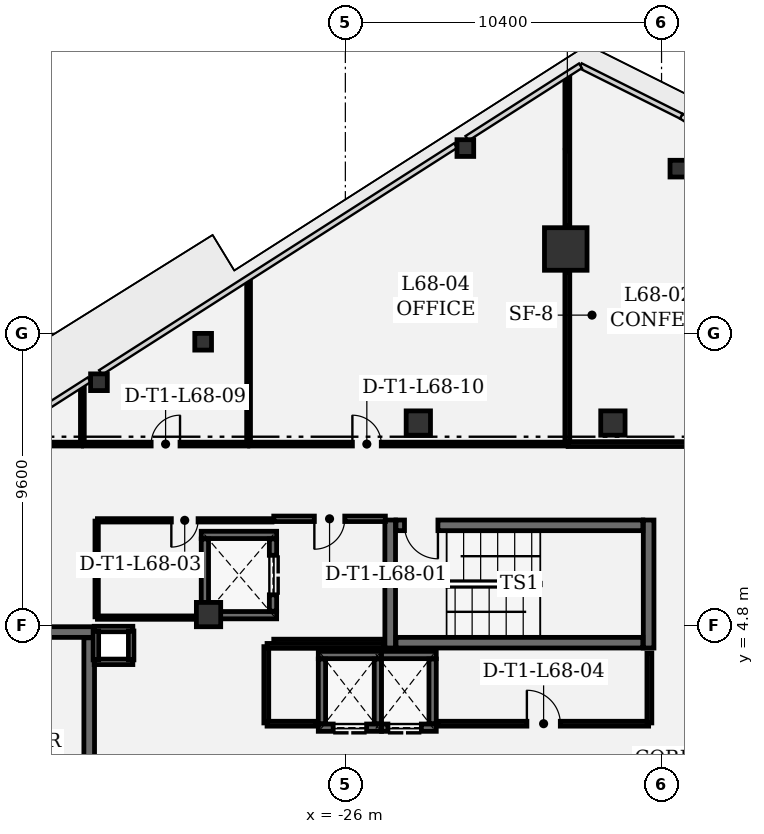
"""IFC4 building model, lengths in metres.
Left out: names, types, materials, properties, quantities, classifications, styles, units other than length and angle.
Written with IfcOpenShell. Run it as: python <this file> out.ifc"""

import sys

from ifc_helpers import new_model, si_unit, direction, frame, frame_2d, origin, origin_2d, place, context, subcontext, project, spatial, rectangle, extrude, element, fill, save


model = new_model("IFC4")
c1 = context("Model", 3, precision=1e-05, world=origin(), true_north=direction((0.0, 1.0)))
c2 = subcontext(c1, "Body", "Model", "MODEL_VIEW")
j1 = project(units=[si_unit("LENGTHUNIT", "METRE"), si_unit("PLANEANGLEUNIT", "RADIAN")], contexts=[c1])
p1 = place(None, origin())
s1 = spatial("IfcSite", under=j1, at=p1, CompositionType="ELEMENT")
p2 = place(p1, origin())
s2 = spatial("IfcBuilding", under=s1, at=p2, CompositionType="ELEMENT")
p3 = place(p2, frame((0.0, 0.0, 293.4)))
s3 = spatial("IfcBuildingStorey", under=s2, at=p3, CompositionType="ELEMENT", Elevation=293.4)
p4 = place(p3, frame((-18.75, 17.176, 0.0), z_axis=(0.0, 0.0, 1.0), x_axis=(1.0, 0.0, 0.0)))
e1 = element("IfcColumn", 1, at=p4, inside=s3, PredefinedType="COLUMN", context=c2, shape_type="SweptSolid", body=[
    extrude(rectangle(XDim=1.4, YDim=1.4, at=origin_2d()), origin(), (0.0, 0.0, 1.0), 4.2),
])
for number, where, z_axis, x_axis in (
    (2, (-23.6, 11.45, 0.0), (0.0, 0.0, 1.0), (1.0, 0.0, 0.0)),
    (3, (-17.2, 11.45, 0.0), (0.0, 0.0, 1.0), (1.0, 0.0, 0.0)),
    (4, (-30.5, 5.15, 0.0), (0.0, 0.0, 1.0), (1.0, 0.0, 0.0)),
):
    element("IfcColumn", number, at=place(p3, frame(where, z_axis=z_axis, x_axis=x_axis)), inside=s3, PredefinedType="COLUMN", context=c2, shape_type="SweptSolid", body=[
        extrude(rectangle(XDim=0.8, YDim=0.8, at=origin_2d()), origin(), (0.0, 0.0, 1.0), 4.2),
    ])
for number, where, z_axis, x_axis in (
    (5, (-34.104, 12.792, 0.0), (0.0, 0.0, 1.0), (1.0, 0.0, 0.0)),
    (6, (-22.053, 20.495, 0.0), (0.0, 0.0, 1.0), (1.0, 0.0, 0.0)),
    (7, (-30.677, 14.124, 0.0), (0.0, 0.0, 1.0), (1.0, 0.0, 0.0)),
    (8, (-15.046, 19.818, 0.0), (0.0, 0.0, 1.0), (1.0, 0.0, 0.0)),
):
    element("IfcColumn", number, at=place(p3, frame(where, z_axis=z_axis, x_axis=x_axis)), inside=s3, PredefinedType="COLUMN", context=c2, shape_type="SweptSolid", body=[
        extrude(rectangle(XDim=0.55, YDim=0.55, at=origin_2d()), origin(), (0.0, 0.0, 1.0), 4.2),
    ])
for number, where, z_axis, x_axis in (
    (9, (-24.525, 8.26, 0.0), (0.0, 0.0, 1.0), (0.0, -1.0, 0.0)),
    (10, (-16.025, 4.05, 0.0), (0.0, 0.0, 1.0), (0.0, 1.0, 0.0)),
):
    element("IfcWall", number, at=place(p3, frame(where, z_axis=z_axis, x_axis=x_axis)), inside=s3, PredefinedType="SHEAR", context=c2, shape_type="SweptSolid", body=[
        extrude(rectangle(XDim=4.21, YDim=0.35, at=frame_2d((2.105, 0.0))), origin(), (0.0, 0.0, 1.0), 3.91),
    ])
p5 = place(p3, frame((-24.335, 4.225, 0.0), z_axis=(0.0, 0.0, 1.0), x_axis=(1.0, 0.0, 0.0)))
e11 = element("IfcWall", 11, at=p5, inside=s3, PredefinedType="SHEAR", context=c2, shape_type="SweptSolid", body=[
    extrude(rectangle(XDim=8.12, YDim=0.35, at=frame_2d((4.06, 0.0))), origin(), (0.0, 0.0, 1.0), 3.91),
])
p6 = place(p3, frame((-16.215, 8.085, 0.0), z_axis=(0.0, 0.0, 1.0), x_axis=(-1.0, 0.0, 0.0)))
e12 = element("IfcWall", 12, at=p6, inside=s3, PredefinedType="SHEAR", context=c2, shape_type="SweptSolid", body=[
    extrude(rectangle(XDim=8.12, YDim=0.35, at=frame_2d((4.06, 0.0))), origin(), (0.0, 0.0, 1.0), 3.91),
])
p7 = place(p6, frame((6.74, 0.0, 0.0)))
e13 = element("IfcOpeningElement", 13, at=p7, cuts=e12, PredefinedType="OPENING", context=c2, shape_type="SweptSolid", body=[
    extrude(rectangle(XDim=1.1, YDim=2.2, at=frame_2d((0.55, 1.1))), frame((0.0, 0.185, 0.0), z_axis=(0.0, -1.0, 0.0), x_axis=(1.0, 0.0, 0.0)), (0.0, 0.0, 1.0), 0.37),
])
p8 = place(p3, frame((-34.25, 4.575, 0.0), z_axis=(0.0, 0.0, 1.0), x_axis=(-1.0, 0.0, 0.0)))
e14 = element("IfcWall", 14, at=p8, inside=s3, PredefinedType="SHEAR", context=c2, shape_type="SweptSolid", body=[
    extrude(rectangle(XDim=4.21, YDim=0.35, at=frame_2d((2.105, 0.0))), origin(), (0.0, 0.0, 1.0), 3.91),
])
p9 = place(p3, frame((-34.425, -4.385, 0.0), z_axis=(0.0, 0.0, 1.0), x_axis=(0.0, 1.0, 0.0)))
e15 = element("IfcWall", 15, at=p9, inside=s3, PredefinedType="SHEAR", context=c2, shape_type="SweptSolid", body=[
    extrude(rectangle(XDim=8.77, YDim=0.35, at=frame_2d((4.385, 0.0))), origin(), (0.0, 0.0, 1.0), 3.91),
])
for number, where, z_axis, x_axis in (
    (16, (-28.26, 5.13, 0.0), (0.0, 0.0, 1.0), (-1.0, 0.0, 0.0)),
    (17, (-30.74, 7.77, 0.0), (0.0, 0.0, 1.0), (1.0, 0.0, 0.0)),
):
    element("IfcWall", number, at=place(p3, frame(where, z_axis=z_axis, x_axis=x_axis)), inside=s3, PredefinedType="SHEAR", context=c2, shape_type="SweptSolid", body=[
        extrude(rectangle(XDim=2.48, YDim=0.24, at=frame_2d((1.24, 0.0))), origin(), (0.0, 0.0, 1.0), 3.91),
    ])
p10 = place(p3, frame((-30.62, 5.262, 0.0), z_axis=(0.0, 0.0, 1.0), x_axis=(0.0, 1.0, 0.0)))
e18 = element("IfcWall", 18, at=p10, inside=s3, PredefinedType="SHEAR", context=c2, shape_type="SweptSolid", body=[
    extrude(rectangle(XDim=2.376, YDim=0.24, at=frame_2d((1.188, 0.0))), origin(), (0.0, 0.0, 1.0), 3.91),
])
p11 = place(p3, frame((-28.38, 7.638, 0.0), z_axis=(0.0, 0.0, 1.0), x_axis=(0.0, -1.0, 0.0)))
e19 = element("IfcWall", 19, at=p11, inside=s3, PredefinedType="SHEAR", context=c2, shape_type="SweptSolid", body=[
    extrude(rectangle(XDim=2.376, YDim=0.24, at=frame_2d((1.188, 0.0))), origin(), (0.0, 0.0, 1.0), 3.91),
])
p12 = place(p11, frame((0.538, 0.0, 0.0)))
e20 = element("IfcOpeningElement", 20, at=p12, cuts=e19, PredefinedType="OPENING", context=c2, shape_type="SweptSolid", body=[
    extrude(rectangle(XDim=1.3, YDim=2.3, at=frame_2d((0.65, 1.15))), frame((0.0, 0.13, 0.0), z_axis=(0.0, -1.0, 0.0), x_axis=(1.0, 0.0, 0.0)), (0.0, 0.0, 1.0), 0.26),
])
p13 = place(p3, frame((-24.81, 1.43, 0.0), z_axis=(0.0, 0.0, 1.0), x_axis=(-1.0, 0.0, 0.0)))
e21 = element("IfcWall", 21, at=p13, inside=s3, PredefinedType="SHEAR", context=c2, shape_type="SweptSolid", body=[
    extrude(rectangle(XDim=2.08, YDim=0.24, at=frame_2d((1.04, 0.0))), origin(), (0.0, 0.0, 1.0), 3.91),
])
p14 = place(p13, frame((0.49, 0.0, 0.0)))
e22 = element("IfcOpeningElement", 22, at=p14, cuts=e21, PredefinedType="OPENING", context=c2, shape_type="SweptSolid", body=[
    extrude(rectangle(XDim=1.1, YDim=2.2, at=frame_2d((0.55, 1.1))), frame((0.0, 0.13, 0.0), z_axis=(0.0, -1.0, 0.0), x_axis=(1.0, 0.0, 0.0)), (0.0, 0.0, 1.0), 0.26),
])
p15 = place(p3, frame((-26.89, 3.82, 0.0), z_axis=(0.0, 0.0, 1.0), x_axis=(1.0, 0.0, 0.0)))
e23 = element("IfcWall", 23, at=p15, inside=s3, PredefinedType="SHEAR", context=c2, shape_type="SweptSolid", body=[
    extrude(rectangle(XDim=2.08, YDim=0.24, at=frame_2d((1.04, 0.0))), origin(), (0.0, 0.0, 1.0), 3.91),
])
for number, where, z_axis, x_axis in (
    (24, (-26.77, 1.562, 0.0), (0.0, 0.0, 1.0), (0.0, 1.0, 0.0)),
    (25, (-24.93, 3.688, 0.0), (0.0, 0.0, 1.0), (0.0, -1.0, 0.0)),
):
    element("IfcWall", number, at=place(p3, frame(where, z_axis=z_axis, x_axis=x_axis)), inside=s3, PredefinedType="SHEAR", context=c2, shape_type="SweptSolid", body=[
        extrude(rectangle(XDim=2.126, YDim=0.24, at=frame_2d((1.063, 0.0))), origin(), (0.0, 0.0, 1.0), 3.91),
    ])
p16 = place(p3, frame((-23.01, 1.43, 0.0), z_axis=(0.0, 0.0, 1.0), x_axis=(-1.0, 0.0, 0.0)))
e26 = element("IfcWall", 26, at=p16, inside=s3, PredefinedType="SHEAR", context=c2, shape_type="SweptSolid", body=[
    extrude(rectangle(XDim=1.8, YDim=0.24, at=frame_2d((0.9, 0.0))), origin(), (0.0, 0.0, 1.0), 3.91),
])
p17 = place(p16, frame((0.49, 0.0, 0.0)))
e27 = element("IfcOpeningElement", 27, at=p17, cuts=e26, PredefinedType="OPENING", context=c2, shape_type="SweptSolid", body=[
    extrude(rectangle(XDim=1.1, YDim=2.2, at=frame_2d((0.55, 1.1))), frame((0.0, 0.13, 0.0), z_axis=(0.0, -1.0, 0.0), x_axis=(1.0, 0.0, 0.0)), (0.0, 0.0, 1.0), 0.26),
])
p18 = place(p3, frame((-24.81, 3.82, 0.0), z_axis=(0.0, 0.0, 1.0), x_axis=(1.0, 0.0, 0.0)))
e28 = element("IfcWall", 28, at=p18, inside=s3, PredefinedType="SHEAR", context=c2, shape_type="SweptSolid", body=[
    extrude(rectangle(XDim=1.8, YDim=0.24, at=frame_2d((0.9, 0.0))), origin(), (0.0, 0.0, 1.0), 3.91),
])
p19 = place(p3, frame((-23.13, 3.688, 0.0), z_axis=(0.0, 0.0, 1.0), x_axis=(0.0, -1.0, 0.0)))
e29 = element("IfcWall", 29, at=p19, inside=s3, PredefinedType="SHEAR", context=c2, shape_type="SweptSolid", body=[
    extrude(rectangle(XDim=2.126, YDim=0.24, at=frame_2d((1.063, 0.0))), origin(), (0.0, 0.0, 1.0), 3.91),
])
for number, where, z_axis, x_axis in (
    (30, (-32.99, 3.595, 0.0), (0.0, 0.0, 1.0), (-1.0, 0.0, 0.0)),
    (31, (-34.26, 4.675, 0.0), (0.0, 0.0, 1.0), (1.0, 0.0, 0.0)),
):
    element("IfcWall", number, at=place(p3, frame(where, z_axis=z_axis, x_axis=x_axis)), inside=s3, PredefinedType="PARTITIONING", context=c2, shape_type="SweptSolid", body=[
        extrude(rectangle(XDim=1.27, YDim=0.18, at=frame_2d((0.635, 0.0))), origin(), (0.0, 0.0, 1.0), 3.91),
    ])
for number, where, z_axis, x_axis in (
    (32, (-34.205, 3.66, 0.0), (0.0, 0.0, 1.0), (0.0, 1.0, 0.0)),
    (33, (-33.045, 4.61, 0.0), (0.0, 0.0, 1.0), (0.0, -1.0, 0.0)),
):
    element("IfcWall", number, at=place(p3, frame(where, z_axis=z_axis, x_axis=x_axis)), inside=s3, PredefinedType="PARTITIONING", context=c2, shape_type="SweptSolid", body=[
        extrude(rectangle(XDim=0.95, YDim=0.18, at=frame_2d((0.475, 0.0))), origin(), (0.0, 0.0, 1.0), 3.91),
    ])
p20 = place(p3, frame((-28.355, 4.25, 0.0), z_axis=(0.0, 0.0, 1.0), x_axis=(1.0, 0.0, 0.0)))
e34 = element("IfcWall", 34, at=p20, inside=s3, PredefinedType="PARTITIONING", context=c2, shape_type="SweptSolid", body=[
    extrude(rectangle(XDim=3.622, YDim=0.18, at=frame_2d((1.811, 0.0))), origin(), (0.0, 0.0, 1.0), 3.91),
])
p21 = place(p3, frame((-24.684, 8.3, 0.0), z_axis=(0.0, 0.0, 1.0), x_axis=(-1.0, 0.0, 0.0)))
e35 = element("IfcWall", 35, at=p21, inside=s3, PredefinedType="PARTITIONING", context=c2, shape_type="SweptSolid", body=[
    extrude(rectangle(XDim=3.671, YDim=0.18, at=frame_2d((1.835, 0.0))), origin(), (0.0, 0.0, 1.0), 3.529),
])
p22 = place(p21, frame((1.335, 0.0, 0.0)))
e36 = element("IfcOpeningElement", 36, at=p22, cuts=e35, PredefinedType="OPENING", context=c2, shape_type="SweptSolid", body=[
    extrude(rectangle(XDim=1.0, YDim=2.15, at=frame_2d((0.5, 1.075))), frame((0.0, 0.1, 0.0), z_axis=(0.0, -1.0, 0.0), x_axis=(1.0, 0.0, 0.0)), (0.0, 0.0, 1.0), 0.2),
])
p23 = place(p3, frame((-34.18, 8.225, 0.0), z_axis=(0.0, 0.0, 1.0), x_axis=(0.0, -1.0, 0.0)))
e37 = element("IfcWall", 37, at=p23, inside=s3, PredefinedType="PARTITIONING", context=c2, shape_type="SweptSolid", body=[
    extrude(rectangle(XDim=3.15, YDim=0.11, at=frame_2d((1.575, 0.0))), origin(), (0.0, 0.0, 1.0), 3.91),
])
p24 = place(p3, frame((-34.155, 5.05, 0.0), z_axis=(0.0, 0.0, 1.0), x_axis=(1.0, 0.0, 0.0)))
e38 = element("IfcWall", 38, at=p24, inside=s3, PredefinedType="PARTITIONING", context=c2, shape_type="SweptSolid", body=[
    extrude(rectangle(XDim=3.19, YDim=0.11, at=frame_2d((1.595, 0.0))), origin(), (0.0, 0.0, 1.0), 3.91),
])
p25 = place(p3, frame((-28.413, 8.25, 0.0), z_axis=(0.0, 0.0, 1.0), x_axis=(-1.0, 0.0, 0.0)))
e39 = element("IfcWall", 39, at=p25, inside=s3, PredefinedType="PARTITIONING", context=c2, shape_type="SweptSolid", body=[
    extrude(rectangle(XDim=5.742, YDim=0.11, at=frame_2d((2.871, 0.0))), origin(), (0.0, 0.0, 1.0), 3.13),
])
p26 = place(p25, frame((2.431, 0.0, 0.0)))
e40 = element("IfcOpeningElement", 40, at=p26, cuts=e39, PredefinedType="OPENING", context=c2, shape_type="SweptSolid", body=[
    extrude(rectangle(XDim=0.88, YDim=2.1, at=frame_2d((0.44, 1.05))), frame((0.0, 0.065, 0.0), z_axis=(0.0, -1.0, 0.0), x_axis=(1.0, 0.0, 0.0)), (0.0, 0.0, 1.0), 0.13),
])
p27 = place(p3, frame((-28.6, 4.095, 0.0), z_axis=(0.0, 0.0, 1.0), x_axis=(0.0, -1.0, 0.0)))
e41 = element("IfcWall", 41, at=p27, inside=s3, PredefinedType="PARTITIONING", context=c2, shape_type="SweptSolid", body=[
    extrude(rectangle(XDim=2.51, YDim=0.16, at=frame_2d((1.255, 0.0))), origin(), (0.0, 0.0, 1.0), 3.91),
])
p28 = place(p3, frame((-28.575, 1.56, 0.0), z_axis=(0.0, 0.0, 1.0), x_axis=(1.0, 0.0, 0.0)))
e42 = element("IfcWall", 42, at=p28, inside=s3, PredefinedType="PARTITIONING", context=c2, shape_type="SweptSolid", body=[
    extrude(rectangle(XDim=1.609, YDim=0.16, at=frame_2d((0.805, 0.0))), origin(), (0.0, 0.0, 1.0), 3.91),
])
p29 = place(p3, frame((-22.934, 1.56, 0.0), z_axis=(0.0, 0.0, 1.0), x_axis=(1.0, 0.0, 0.0)))
e43 = element("IfcWall", 43, at=p29, inside=s3, PredefinedType="PARTITIONING", context=c2, shape_type="SweptSolid", body=[
    extrude(rectangle(XDim=6.909, YDim=0.16, at=frame_2d((3.455, 0.0))), origin(), (0.0, 0.0, 1.0), 3.91),
])
p30 = place(p29, frame((2.905, 0.0, 0.0)))
e44 = element("IfcOpeningElement", 44, at=p30, cuts=e43, PredefinedType="OPENING", context=c2, shape_type="SweptSolid", body=[
    extrude(rectangle(XDim=1.1, YDim=2.15, at=frame_2d((0.55, 1.075))), frame((0.0, 0.09, 0.0), z_axis=(0.0, -1.0, 0.0), x_axis=(1.0, 0.0, 0.0)), (0.0, 0.0, 1.0), 0.18),
])
p31 = place(p3, frame((-16.0, 1.585, 0.0), z_axis=(0.0, 0.0, 1.0), x_axis=(0.0, 1.0, 0.0)))
e45 = element("IfcWall", 45, at=p31, inside=s3, PredefinedType="PARTITIONING", context=c2, shape_type="SweptSolid", body=[
    extrude(rectangle(XDim=2.302, YDim=0.16, at=frame_2d((1.151, 0.0))), origin(), (0.0, 0.0, 1.0), 3.91),
])
p32 = place(p3, frame((-24.733, 4.12, 0.0), z_axis=(0.0, 0.0, 1.0), x_axis=(-1.0, 0.0, 0.0)))
e46 = element("IfcWall", 46, at=p32, inside=s3, PredefinedType="PARTITIONING", context=c2, shape_type="SweptSolid", body=[
    extrude(rectangle(XDim=3.842, YDim=0.16, at=frame_2d((1.921, 0.0))), origin(), (0.0, 0.0, 1.0), 3.91),
])
p33 = place(p3, frame((-34.675, 10.758, 0.0), z_axis=(0.0, 0.0, 1.0), x_axis=(-1.0, 0.0, 0.0)))
e47 = element("IfcWall", 47, at=p33, inside=s3, PredefinedType="PARTITIONING", context=c2, shape_type="SweptSolid", body=[
    extrude(rectangle(XDim=2.98, YDim=0.125, at=frame_2d((1.49, 0.0))), origin(), (0.0, 0.0, 1.0), 3.91),
])
p34 = place(p3, frame((-34.65, 10.783, 0.0), z_axis=(0.0, 0.0, 1.0), x_axis=(0.0, 1.0, 0.0)))
e48 = element("IfcWall", 48, at=p34, inside=s3, PredefinedType="PARTITIONING", context=c2, shape_type="SweptSolid", body=[
    extrude(rectangle(XDim=1.867, YDim=0.125, at=frame_2d((0.934, 0.0))), origin(), (0.0, 0.0, 1.0), 3.91),
])
p35 = place(p3, frame((-18.699, 22.845, 0.0), z_axis=(0.0, 0.0, 1.0), x_axis=(4.9780964e-05, -0.999999998761, 0.0)))
e49 = element("IfcWall", 49, at=p35, inside=s3, PredefinedType="PARTITIONING", context=c2, shape_type="SweptSolid", body=[
    extrude(rectangle(XDim=4.904, YDim=0.16, at=frame_2d((2.452, 0.0))), origin(), (0.0, 0.0, 1.0), 3.91),
])
p36 = place(p3, frame((-18.698, 16.411, 0.0), z_axis=(0.0, 0.0, 1.0), x_axis=(-4.3383948e-05, -0.999999999059, 0.0)))
e50 = element("IfcWall", 50, at=p36, inside=s3, PredefinedType="PARTITIONING", context=c2, shape_type="SweptSolid", body=[
    extrude(rectangle(XDim=5.627, YDim=0.16, at=frame_2d((2.814, 0.0))), origin(), (0.0, 0.0, 1.0), 3.13),
])
p37 = place(p3, frame((-13.167, 10.758, 0.0), z_axis=(0.0, 0.0, 1.0), x_axis=(-1.0, 0.0, 0.0)))
e51 = element("IfcWall", 51, at=p37, inside=s3, PredefinedType="PARTITIONING", context=c2, shape_type="SweptSolid", body=[
    extrude(rectangle(XDim=5.507, YDim=0.16, at=frame_2d((2.753, 0.0))), origin(), (0.0, 0.0, 1.0), 3.529),
])
p38 = place(p3, frame((-34.617, 10.758, 0.0), z_axis=(0.0, 0.0, 1.0), x_axis=(1.0, 0.0, 0.0)))
e52 = element("IfcWall", 52, at=p38, inside=s3, PredefinedType="PARTITIONING", context=c2, shape_type="SweptSolid", body=[
    extrude(rectangle(XDim=5.409, YDim=0.125, at=frame_2d((2.705, 0.0))), origin(), (0.0, 0.0, 1.0), 3.13),
])
p39 = place(p38, frame((2.229, 0.0, 0.0)))
e53 = element("IfcOpeningElement", 53, at=p39, cuts=e52, PredefinedType="OPENING", context=c2, shape_type="SweptSolid", body=[
    extrude(rectangle(XDim=0.95, YDim=2.15, at=frame_2d((0.475, 1.075))), frame((0.0, 0.073, 0.0), z_axis=(0.0, -1.0, 0.0), x_axis=(1.0, 0.0, 0.0)), (0.0, 0.0, 1.0), 0.145),
])
p40 = place(p3, frame((-29.183, 10.783, 0.0), z_axis=(0.0, 0.0, 1.0), x_axis=(0.0, 1.0, 0.0)))
e54 = element("IfcWall", 54, at=p40, inside=s3, PredefinedType="PARTITIONING", context=c2, shape_type="SweptSolid", body=[
    extrude(rectangle(XDim=5.361, YDim=0.125, at=frame_2d((2.68, 0.0))), origin(), (0.0, 0.0, 1.0), 3.91),
])
p41 = place(p3, frame((-29.15, 10.758, 0.0), z_axis=(0.0, 0.0, 1.0), x_axis=(1.0, 0.0, 0.0)))
e55 = element("IfcWall", 55, at=p41, inside=s3, PredefinedType="PARTITIONING", context=c2, shape_type="SweptSolid", body=[
    extrude(rectangle(XDim=10.419, YDim=0.125, at=frame_2d((5.209, 0.0))), origin(), (0.0, 0.0, 1.0), 3.13),
])
p42 = place(p41, frame((3.382, 0.0, 0.0)))
e56 = element("IfcOpeningElement", 56, at=p42, cuts=e55, PredefinedType="OPENING", context=c2, shape_type="SweptSolid", body=[
    extrude(rectangle(XDim=0.95, YDim=2.15, at=frame_2d((0.475, 1.075))), frame((0.0, 0.073, 0.0), z_axis=(0.0, -1.0, 0.0), x_axis=(1.0, 0.0, 0.0)), (0.0, 0.0, 1.0), 0.145),
])
p43 = place(p7, origin())
e57 = element("IfcDoor", 57, at=p43, inside=s3, OperationType="SINGLE_SWING_LEFT", PredefinedType="DOOR", context=c2, shape_type="SweptSolid", body=[
    extrude(rectangle(XDim=1.1, YDim=2.2, at=frame_2d((0.55, 1.1))), frame((0.0, 0.025, 0.0), z_axis=(0.0, -1.0, 0.0), x_axis=(1.0, 0.0, 0.0)), (0.0, 0.0, 1.0), 0.05),
])
fill(e13, e57)
p44 = place(p12, origin())
e58 = element("IfcDoor", 58, at=p44, inside=s3, OperationType="DOUBLE_DOOR_SLIDING", PredefinedType="DOOR", context=c2, shape_type="SweptSolid", body=[
    extrude(rectangle(XDim=1.3, YDim=2.3, at=frame_2d((0.65, 1.15))), frame((0.0, 0.025, 0.0), z_axis=(0.0, -1.0, 0.0), x_axis=(1.0, 0.0, 0.0)), (0.0, 0.0, 1.0), 0.05),
])
fill(e20, e58)
p45 = place(p14, origin())
e59 = element("IfcDoor", 59, at=p45, inside=s3, OperationType="DOUBLE_DOOR_SLIDING", PredefinedType="DOOR", context=c2, shape_type="SweptSolid", body=[
    extrude(rectangle(XDim=1.1, YDim=2.2, at=frame_2d((0.55, 1.1))), frame((0.0, 0.025, 0.0), z_axis=(0.0, -1.0, 0.0), x_axis=(1.0, 0.0, 0.0)), (0.0, 0.0, 1.0), 0.05),
])
fill(e22, e59)
p46 = place(p17, origin())
e60 = element("IfcDoor", 60, at=p46, inside=s3, OperationType="DOUBLE_DOOR_SLIDING", PredefinedType="DOOR", context=c2, shape_type="SweptSolid", body=[
    extrude(rectangle(XDim=1.1, YDim=2.2, at=frame_2d((0.55, 1.1))), frame((0.0, 0.025, 0.0), z_axis=(0.0, -1.0, 0.0), x_axis=(1.0, 0.0, 0.0)), (0.0, 0.0, 1.0), 0.05),
])
fill(e27, e60)
p47 = place(p22, origin())
e61 = element("IfcDoor", 61, at=p47, inside=s3, OperationType="SINGLE_SWING_RIGHT", PredefinedType="DOOR", context=c2, shape_type="SweptSolid", body=[
    extrude(rectangle(XDim=1.0, YDim=2.15, at=frame_2d((0.5, 1.075))), frame((0.0, 0.025, 0.0), z_axis=(0.0, -1.0, 0.0), x_axis=(1.0, 0.0, 0.0)), (0.0, 0.0, 1.0), 0.05),
])
fill(e36, e61)
p48 = place(p26, origin())
e62 = element("IfcDoor", 62, at=p48, inside=s3, OperationType="SINGLE_SWING_RIGHT", PredefinedType="DOOR", context=c2, shape_type="SweptSolid", body=[
    extrude(rectangle(XDim=0.88, YDim=2.1, at=frame_2d((0.44, 1.05))), frame((0.0, 0.025, 0.0), z_axis=(0.0, -1.0, 0.0), x_axis=(1.0, 0.0, 0.0)), (0.0, 0.0, 1.0), 0.05),
])
fill(e40, e62)
p49 = place(p30, origin())
e63 = element("IfcDoor", 63, at=p49, inside=s3, OperationType="SINGLE_SWING_LEFT", PredefinedType="DOOR", context=c2, shape_type="SweptSolid", body=[
    extrude(rectangle(XDim=1.1, YDim=2.15, at=frame_2d((0.55, 1.075))), frame((0.0, 0.025, 0.0), z_axis=(0.0, -1.0, 0.0), x_axis=(1.0, 0.0, 0.0)), (0.0, 0.0, 1.0), 0.05),
])
fill(e44, e63)
p50 = place(p39, origin())
e64 = element("IfcDoor", 64, at=p50, inside=s3, OperationType="SINGLE_SWING_RIGHT", PredefinedType="DOOR", context=c2, shape_type="SweptSolid", body=[
    extrude(rectangle(XDim=0.95, YDim=2.15, at=frame_2d((0.475, 1.075))), frame((0.0, 0.025, 0.0), z_axis=(0.0, -1.0, 0.0), x_axis=(1.0, 0.0, 0.0)), (0.0, 0.0, 1.0), 0.05),
])
fill(e53, e64)
p51 = place(p42, origin())
e65 = element("IfcDoor", 65, at=p51, inside=s3, OperationType="SINGLE_SWING_LEFT", PredefinedType="DOOR", context=c2, shape_type="SweptSolid", body=[
    extrude(rectangle(XDim=0.95, YDim=2.15, at=frame_2d((0.475, 1.075))), frame((0.0, 0.025, 0.0), z_axis=(0.0, -1.0, 0.0), x_axis=(1.0, 0.0, 0.0)), (0.0, 0.0, 1.0), 0.05),
])
fill(e56, e65)
save(model, sys.argv[1])
